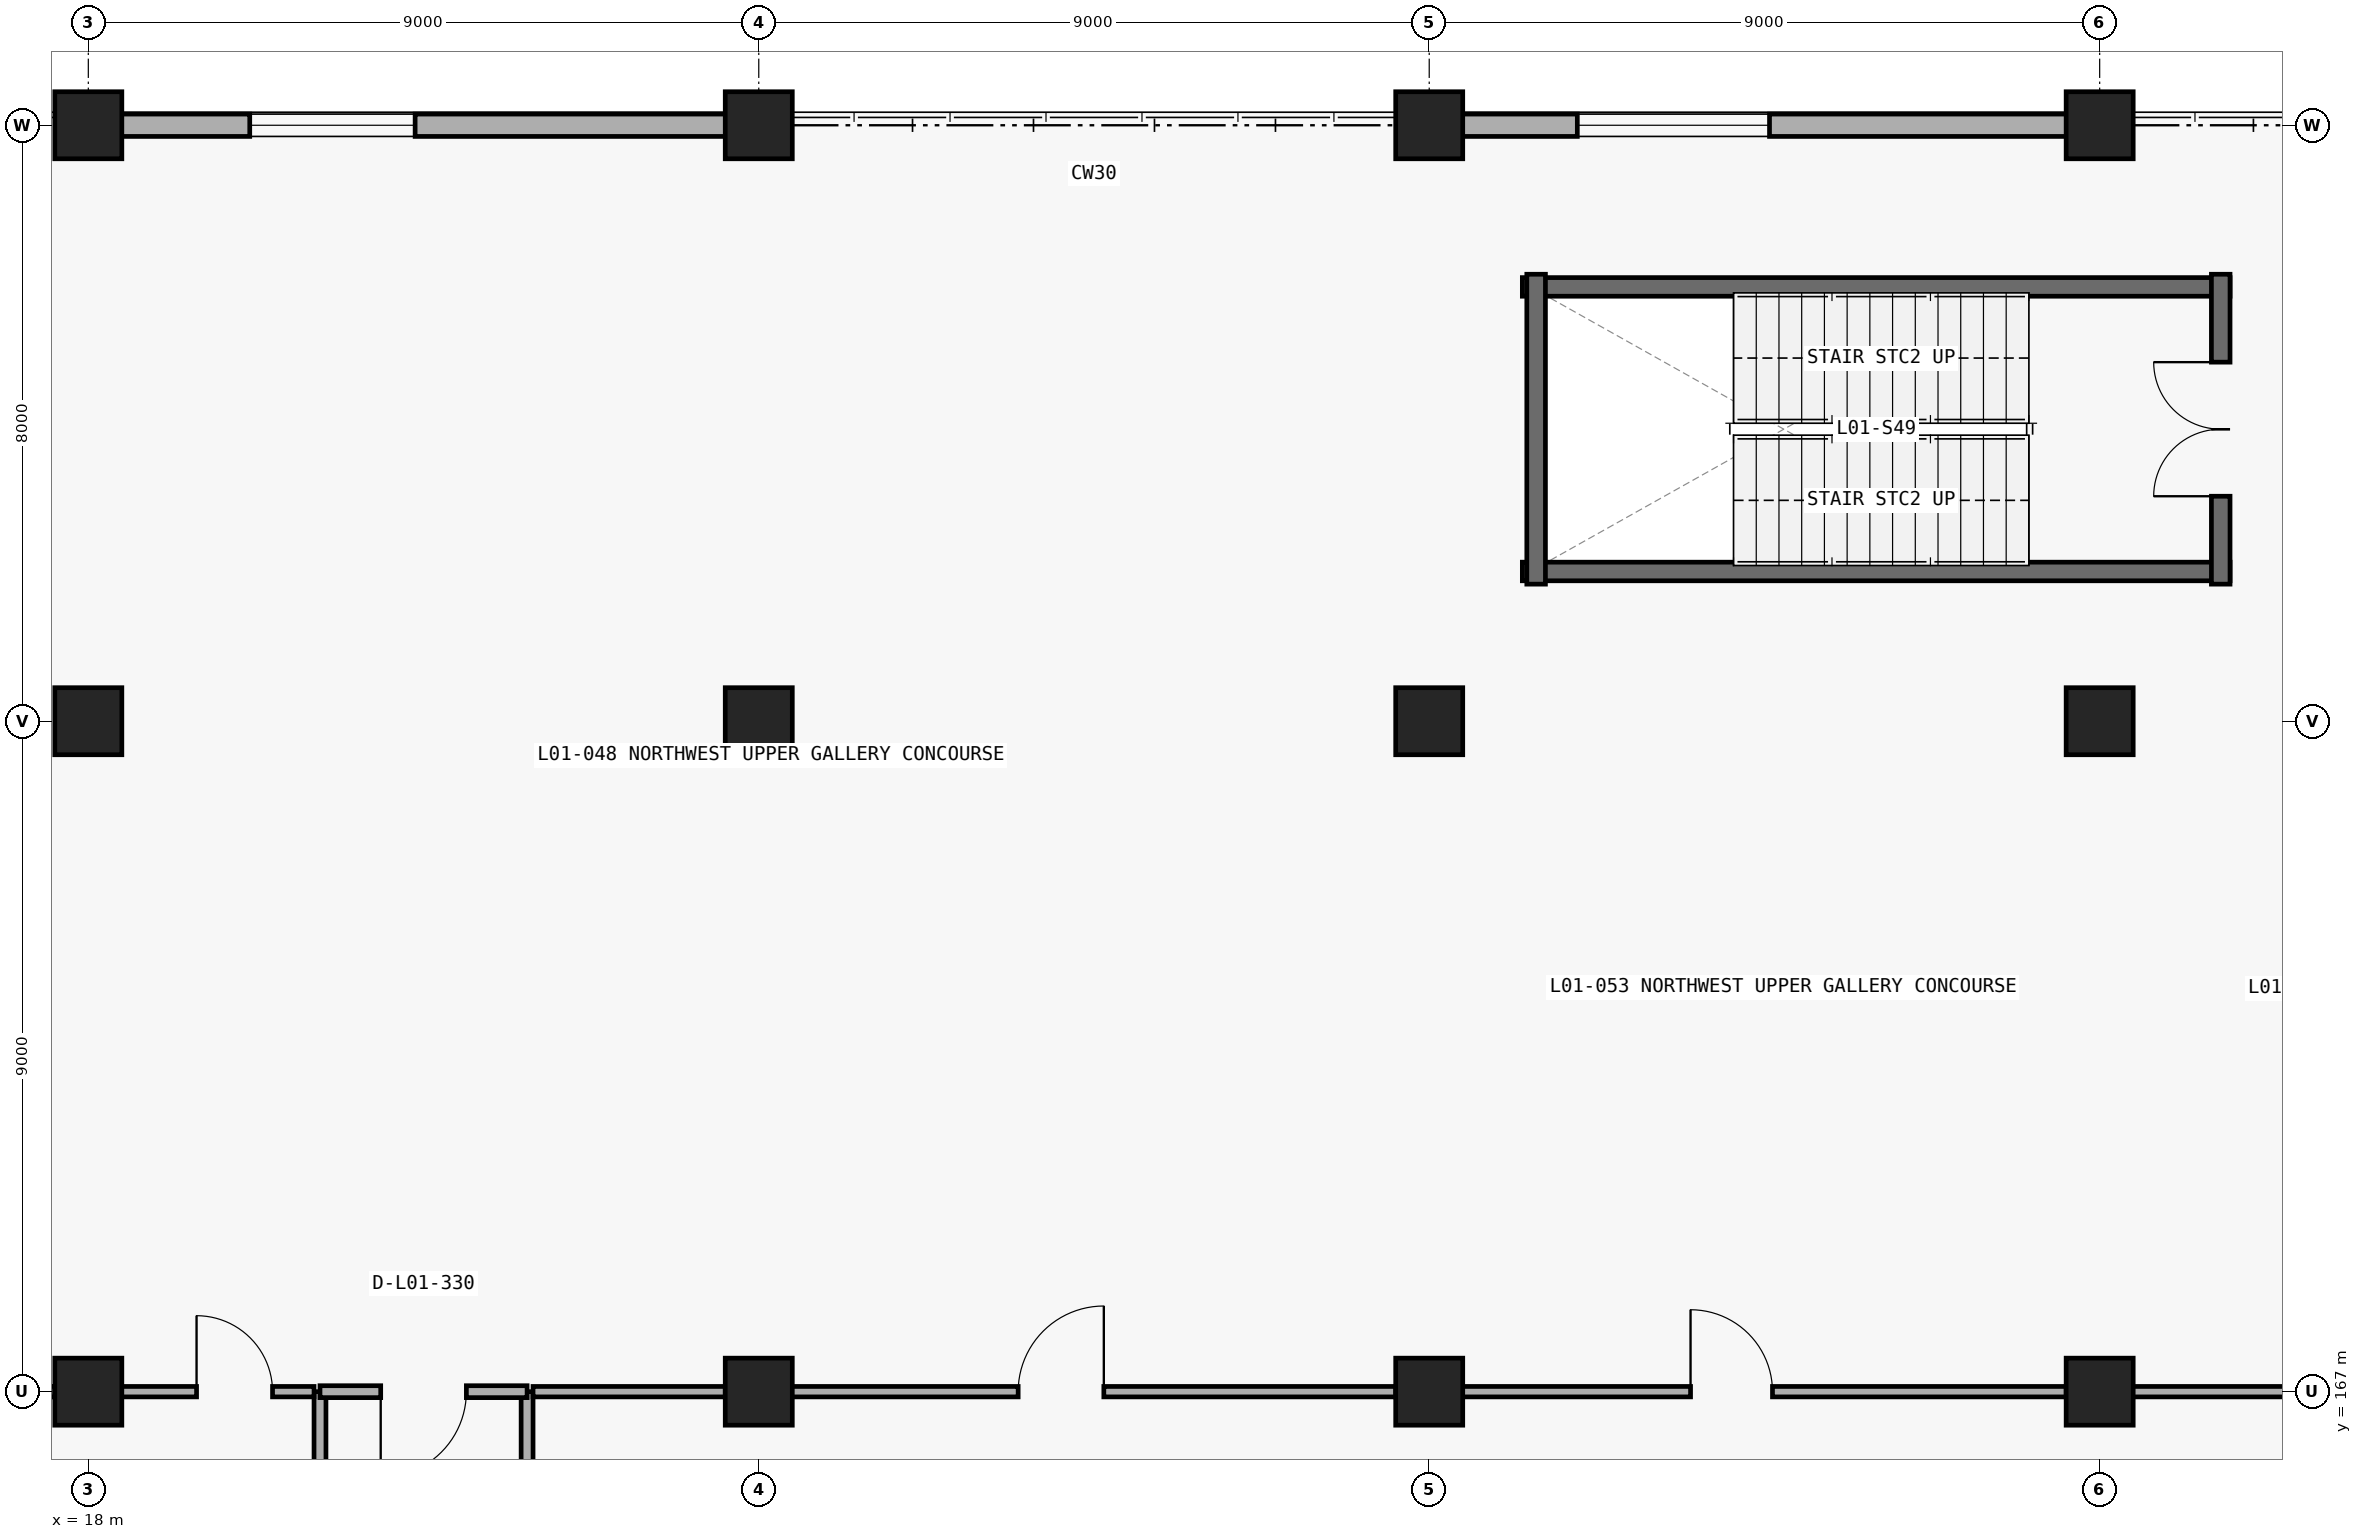
"""IFC4 building model, lengths in metres.
Left out: names, types, materials, properties, quantities, classifications, styles, units other than length and angle.
Written with IfcOpenShell. Run it as: python <this file> out.ifc"""

import sys

from ifc_helpers import new_model, si_unit, direction, frame, frame_2d, origin, origin_2d, place, context, subcontext, project, spatial, rectangle, extrude, element, fill, save


model = new_model("IFC4")
c1 = context("Model", 3, precision=1e-05, world=origin(), true_north=direction((0.0, 1.0)))
c2 = subcontext(c1, "Body", "Model", "MODEL_VIEW")
j1 = project(units=[si_unit("LENGTHUNIT", "METRE"), si_unit("PLANEANGLEUNIT", "RADIAN")], contexts=[c1])
p1 = place(None, origin())
s1 = spatial("IfcSite", under=j1, at=p1, CompositionType="ELEMENT")
p2 = place(p1, origin())
s2 = spatial("IfcBuilding", under=s1, at=p2, CompositionType="ELEMENT")
p3 = place(p2, frame((0.0, 0.0, 5.4)))
s3 = spatial("IfcBuildingStorey", under=s2, at=p3, CompositionType="ELEMENT", Elevation=5.4)
for number, where, z_axis, x_axis in (
    (1, (18.0, 167.0, 0.0), (0.0, 0.0, 1.0), (1.0, 0.0, 0.0)),
    (2, (18.0, 176.0, 0.0), (0.0, 0.0, 1.0), (1.0, 0.0, 0.0)),
    (3, (18.0, 184.0, 0.0), (0.0, 0.0, 1.0), (1.0, 0.0, 0.0)),
    (4, (27.0, 167.0, 0.0), (0.0, 0.0, 1.0), (1.0, 0.0, 0.0)),
    (5, (27.0, 176.0, 0.0), (0.0, 0.0, 1.0), (1.0, 0.0, 0.0)),
    (6, (27.0, 184.0, 0.0), (0.0, 0.0, 1.0), (1.0, 0.0, 0.0)),
    (7, (36.0, 167.0, 0.0), (0.0, 0.0, 1.0), (1.0, 0.0, 0.0)),
    (8, (36.0, 176.0, 0.0), (0.0, 0.0, 1.0), (1.0, 0.0, 0.0)),
    (9, (36.0, 184.0, 0.0), (0.0, 0.0, 1.0), (1.0, 0.0, 0.0)),
    (10, (45.0, 167.0, 0.0), (0.0, 0.0, 1.0), (1.0, 0.0, 0.0)),
    (11, (45.0, 176.0, 0.0), (0.0, 0.0, 1.0), (1.0, 0.0, 0.0)),
    (12, (45.0, 184.0, 0.0), (0.0, 0.0, 1.0), (1.0, 0.0, 0.0)),
):
    element("IfcColumn", number, at=place(p3, frame(where, z_axis=z_axis, x_axis=x_axis)), inside=s3, PredefinedType="COLUMN", context=c2, shape_type="SweptSolid", body=[
        extrude(rectangle(XDim=0.9, YDim=0.9, at=origin_2d()), origin(), (0.0, 0.0, 1.0), 4.8),
    ])
p4 = place(p3, frame((18.425, 184.0, 0.0), z_axis=(0.0, 0.0, 1.0), x_axis=(1.0, 0.0, 0.0)))
e13 = element("IfcWall", 13, at=p4, inside=s3, PredefinedType="STANDARD", context=c2, shape_type="SweptSolid", body=[
    extrude(rectangle(XDim=8.15, YDim=0.3, at=frame_2d((4.075, 0.0))), origin(), (0.0, 0.0, 1.0), 3.804),
])
p5 = place(p4, frame((1.742, 0.0, 0.95)))
e14 = element("IfcOpeningElement", 14, at=p5, cuts=e13, PredefinedType="OPENING", context=c2, shape_type="SweptSolid", body=[
    extrude(rectangle(XDim=2.22, YDim=2.24, at=frame_2d((1.11, 1.12))), frame((0.0, 0.16, 0.0), z_axis=(0.0, -1.0, 0.0), x_axis=(1.0, 0.0, 0.0)), (0.0, 0.0, 1.0), 0.32),
])
p6 = place(p3, frame((36.425, 184.0, 0.0), z_axis=(0.0, 0.0, 1.0), x_axis=(1.0, 0.0, 0.0)))
e15 = element("IfcWall", 15, at=p6, inside=s3, PredefinedType="STANDARD", context=c2, shape_type="SweptSolid", body=[
    extrude(rectangle(XDim=8.15, YDim=0.3, at=frame_2d((4.075, 0.0))), origin(), (0.0, 0.0, 1.0), 3.804),
])
p7 = place(p6, frame((1.563, 0.0, 0.95)))
e16 = element("IfcOpeningElement", 16, at=p7, cuts=e15, PredefinedType="OPENING", context=c2, shape_type="SweptSolid", body=[
    extrude(rectangle(XDim=2.58, YDim=2.28, at=frame_2d((1.29, 1.14))), frame((0.0, 0.16, 0.0), z_axis=(0.0, -1.0, 0.0), x_axis=(1.0, 0.0, 0.0)), (0.0, 0.0, 1.0), 0.32),
])
for number, where, z_axis, x_axis in (
    (17, (46.75, 181.83, 0.0), (0.0, 0.0, 1.0), (-1.0, 0.0, 0.0)),
    (18, (37.25, 178.01, 0.0), (0.0, 0.0, 1.0), (1.0, 0.0, 0.0)),
):
    element("IfcWall", number, at=place(p3, frame(where, z_axis=z_axis, x_axis=x_axis)), inside=s3, PredefinedType="SHEAR", context=c2, shape_type="SweptSolid", body=[
        extrude(rectangle(XDim=9.5, YDim=0.25, at=frame_2d((4.75, 0.0))), origin(), (0.0, 0.0, 1.0), 4.52),
    ])
p8 = place(p3, frame((46.625, 177.84, 0.0), z_axis=(0.0, 0.0, 1.0), x_axis=(0.0, 1.0, 0.0)))
e19 = element("IfcWall", 19, at=p8, inside=s3, PredefinedType="SHEAR", context=c2, shape_type="SweptSolid", body=[
    extrude(rectangle(XDim=4.16, YDim=0.25, at=frame_2d((2.08, 0.0))), origin(), (0.0, 0.0, 1.0), 4.52),
])
p9 = place(p8, frame((1.18, 0.0, 0.0)))
e20 = element("IfcOpeningElement", 20, at=p9, cuts=e19, PredefinedType="OPENING", context=c2, shape_type="SweptSolid", body=[
    extrude(rectangle(XDim=1.8, YDim=2.25, at=frame_2d((0.9, 1.125))), frame((0.0, 0.135, 0.0), z_axis=(0.0, -1.0, 0.0), x_axis=(1.0, 0.0, 0.0)), (0.0, 0.0, 1.0), 0.27),
])
p10 = place(p3, frame((37.435, 182.0, 0.0), z_axis=(0.0, 0.0, 1.0), x_axis=(0.0, -1.0, 0.0)))
e21 = element("IfcWall", 21, at=p10, inside=s3, PredefinedType="SHEAR", context=c2, shape_type="SweptSolid", body=[
    extrude(rectangle(XDim=4.16, YDim=0.25, at=frame_2d((2.08, 0.0))), origin(), (0.0, 0.0, 1.0), 4.52),
])
for number, where, z_axis, x_axis in (
    (22, (23.89, 164.25, 0.0), (0.0, 0.0, 1.0), (0.0, 1.0, 0.0)),
    (23, (21.11, 164.25, 0.0), (0.0, 0.0, 1.0), (0.0, 1.0, 0.0)),
):
    element("IfcWall", number, at=place(p3, frame(where, z_axis=z_axis, x_axis=x_axis)), inside=s3, PredefinedType="PARTITIONING", context=c2, shape_type="SweptSolid", body=[
        extrude(rectangle(XDim=2.75, YDim=0.16, at=frame_2d((1.375, 0.0))), origin(), (0.0, 0.0, 1.0), 3.804),
    ])
p11 = place(p3, frame((23.89, 167.0, 0.0), z_axis=(0.0, 0.0, 1.0), x_axis=(-1.0, 0.0, 0.0)))
e24 = element("IfcWall", 24, at=p11, inside=s3, PredefinedType="PARTITIONING", context=c2, shape_type="SweptSolid", body=[
    extrude(rectangle(XDim=2.78, YDim=0.16, at=frame_2d((1.39, 0.0))), origin(), (0.0, 0.0, 1.0), 3.804),
])
p12 = place(p11, frame((0.815, 0.0, 0.0)))
e25 = element("IfcOpeningElement", 25, at=p12, cuts=e24, PredefinedType="OPENING", context=c2, shape_type="SweptSolid", body=[
    extrude(rectangle(XDim=1.15, YDim=2.2, at=frame_2d((0.575, 1.1))), frame((0.0, 0.09, 0.0), z_axis=(0.0, -1.0, 0.0), x_axis=(1.0, 0.0, 0.0)), (0.0, 0.0, 1.0), 0.18),
])
p13 = place(p3, frame((8.55, 167.0, 0.0), z_axis=(0.0, 0.0, 1.0), x_axis=(1.0, 0.0, 0.0)))
e26 = element("IfcWall", 26, at=p13, inside=s3, PredefinedType="PARTITIONING", context=c2, shape_type="SweptSolid", body=[
    extrude(rectangle(XDim=9.015, YDim=0.14, at=frame_2d((4.507, 0.0))), origin(), (0.0, 0.0, 1.0), 3.804),
])
p14 = place(p13, frame((3.633, 0.0, 0.0)))
e27 = element("IfcOpeningElement", 27, at=p14, cuts=e26, PredefinedType="OPENING", context=c2, shape_type="SweptSolid", body=[
    extrude(rectangle(XDim=1.75, YDim=2.3, at=frame_2d((0.875, 1.15))), frame((0.0, 0.08, 0.0), z_axis=(0.0, -1.0, 0.0), x_axis=(1.0, 0.0, 0.0)), (0.0, 0.0, 1.0), 0.16),
])
p15 = place(p3, frame((17.55, 167.0, 0.0), z_axis=(0.0, 0.0, 1.0), x_axis=(1.0, 0.0, 0.0)))
e28 = element("IfcWall", 28, at=p15, inside=s3, PredefinedType="PARTITIONING", context=c2, shape_type="SweptSolid", body=[
    extrude(rectangle(XDim=3.48, YDim=0.14, at=frame_2d((1.74, 0.0))), origin(), (0.0, 0.0, 1.0), 3.804),
])
p16 = place(p15, frame((1.903, 0.0, 0.0)))
e29 = element("IfcOpeningElement", 29, at=p16, cuts=e28, PredefinedType="OPENING", context=c2, shape_type="SweptSolid", body=[
    extrude(rectangle(XDim=1.02, YDim=2.2, at=frame_2d((0.51, 1.1))), frame((0.0, 0.08, 0.0), z_axis=(0.0, -1.0, 0.0), x_axis=(1.0, 0.0, 0.0)), (0.0, 0.0, 1.0), 0.16),
])
p17 = place(p3, frame((23.97, 167.0, 0.0), z_axis=(0.0, 0.0, 1.0), x_axis=(1.0, 0.0, 0.0)))
e30 = element("IfcWall", 30, at=p17, inside=s3, PredefinedType="PARTITIONING", context=c2, shape_type="SweptSolid", body=[
    extrude(rectangle(XDim=2.595, YDim=0.14, at=frame_2d((1.297, 0.0))), origin(), (0.0, 0.0, 1.0), 3.804),
])
p18 = place(p3, frame((26.55, 167.0, 0.0), z_axis=(0.0, 0.0, 1.0), x_axis=(1.0, 0.0, 0.0)))
e31 = element("IfcWall", 31, at=p18, inside=s3, PredefinedType="PARTITIONING", context=c2, shape_type="SweptSolid", body=[
    extrude(rectangle(XDim=9.015, YDim=0.14, at=frame_2d((4.507, 0.0))), origin(), (0.0, 0.0, 1.0), 3.804),
])
p19 = place(p18, frame((3.932, 0.0, 0.0)))
e32 = element("IfcOpeningElement", 32, at=p19, cuts=e31, PredefinedType="OPENING", context=c2, shape_type="SweptSolid", body=[
    extrude(rectangle(XDim=1.15, YDim=2.2, at=frame_2d((0.575, 1.1))), frame((0.0, 0.08, 0.0), z_axis=(0.0, -1.0, 0.0), x_axis=(1.0, 0.0, 0.0)), (0.0, 0.0, 1.0), 0.16),
])
p20 = place(p3, frame((35.55, 167.0, 0.0), z_axis=(0.0, 0.0, 1.0), x_axis=(1.0, 0.0, 0.0)))
e33 = element("IfcWall", 33, at=p20, inside=s3, PredefinedType="PARTITIONING", context=c2, shape_type="SweptSolid", body=[
    extrude(rectangle(XDim=9.015, YDim=0.14, at=frame_2d((4.507, 0.0))), origin(), (0.0, 0.0, 1.0), 3.804),
])
p21 = place(p20, frame((3.958, 0.0, 0.0)))
e34 = element("IfcOpeningElement", 34, at=p21, cuts=e33, PredefinedType="OPENING", context=c2, shape_type="SweptSolid", body=[
    extrude(rectangle(XDim=1.1, YDim=2.15, at=frame_2d((0.55, 1.075))), frame((0.0, 0.08, 0.0), z_axis=(0.0, -1.0, 0.0), x_axis=(1.0, 0.0, 0.0)), (0.0, 0.0, 1.0), 0.16),
])
p22 = place(p3, frame((44.55, 167.0, 0.0), z_axis=(0.0, 0.0, 1.0), x_axis=(1.0, 0.0, 0.0)))
e35 = element("IfcWall", 35, at=p22, inside=s3, PredefinedType="PARTITIONING", context=c2, shape_type="SweptSolid", body=[
    extrude(rectangle(XDim=9.015, YDim=0.14, at=frame_2d((4.507, 0.0))), origin(), (0.0, 0.0, 1.0), 3.804),
])
p23 = place(p22, frame((3.908, 0.0, 0.0)))
e36 = element("IfcOpeningElement", 36, at=p23, cuts=e35, PredefinedType="OPENING", context=c2, shape_type="SweptSolid", body=[
    extrude(rectangle(XDim=1.2, YDim=2.25, at=frame_2d((0.6, 1.125))), frame((0.0, 0.08, 0.0), z_axis=(0.0, -1.0, 0.0), x_axis=(1.0, 0.0, 0.0)), (0.0, 0.0, 1.0), 0.16),
])
p24 = place(p5, origin())
e37 = element("IfcWindow", 37, at=p24, inside=s3, PartitioningType="SINGLE_PANEL", PredefinedType="WINDOW", context=c2, shape_type="SweptSolid", body=[
    extrude(rectangle(XDim=2.22, YDim=2.24, at=frame_2d((1.11, 1.12))), frame((0.0, 0.03, 0.0), z_axis=(0.0, -1.0, 0.0), x_axis=(1.0, 0.0, 0.0)), (0.0, 0.0, 1.0), 0.06),
])
fill(e14, e37)
p25 = place(p7, origin())
e38 = element("IfcWindow", 38, at=p25, inside=s3, PartitioningType="SINGLE_PANEL", PredefinedType="WINDOW", context=c2, shape_type="SweptSolid", body=[
    extrude(rectangle(XDim=2.58, YDim=2.28, at=frame_2d((1.29, 1.14))), frame((0.0, 0.03, 0.0), z_axis=(0.0, -1.0, 0.0), x_axis=(1.0, 0.0, 0.0)), (0.0, 0.0, 1.0), 0.06),
])
fill(e16, e38)
p26 = place(p9, origin())
e39 = element("IfcDoor", 39, at=p26, inside=s3, OperationType="DOUBLE_DOOR_SINGLE_SWING", PredefinedType="DOOR", context=c2, shape_type="SweptSolid", body=[
    extrude(rectangle(XDim=1.8, YDim=2.25, at=frame_2d((0.9, 1.125))), frame((0.0, 0.025, 0.0), z_axis=(0.0, -1.0, 0.0), x_axis=(1.0, 0.0, 0.0)), (0.0, 0.0, 1.0), 0.05),
])
fill(e20, e39)
p27 = place(p12, origin())
e40 = element("IfcDoor", 40, at=p27, inside=s3, OperationType="SINGLE_SWING_RIGHT", PredefinedType="DOOR", context=c2, shape_type="SweptSolid", body=[
    extrude(rectangle(XDim=1.15, YDim=2.2, at=frame_2d((0.575, 1.1))), frame((0.0, 0.025, 0.0), z_axis=(0.0, -1.0, 0.0), x_axis=(1.0, 0.0, 0.0)), (0.0, 0.0, 1.0), 0.05),
])
fill(e25, e40)
p28 = place(p16, origin())
e41 = element("IfcDoor", 41, at=p28, inside=s3, OperationType="SINGLE_SWING_LEFT", PredefinedType="DOOR", context=c2, shape_type="SweptSolid", body=[
    extrude(rectangle(XDim=1.02, YDim=2.2, at=frame_2d((0.51, 1.1))), frame((0.0, 0.025, 0.0), z_axis=(0.0, -1.0, 0.0), x_axis=(1.0, 0.0, 0.0)), (0.0, 0.0, 1.0), 0.05),
])
fill(e29, e41)
p29 = place(p19, origin())
e42 = element("IfcDoor", 42, at=p29, inside=s3, OperationType="SINGLE_SWING_RIGHT", PredefinedType="DOOR", context=c2, shape_type="SweptSolid", body=[
    extrude(rectangle(XDim=1.15, YDim=2.2, at=frame_2d((0.575, 1.1))), frame((0.0, 0.025, 0.0), z_axis=(0.0, -1.0, 0.0), x_axis=(1.0, 0.0, 0.0)), (0.0, 0.0, 1.0), 0.05),
])
fill(e32, e42)
p30 = place(p21, origin())
e43 = element("IfcDoor", 43, at=p30, inside=s3, OperationType="SINGLE_SWING_LEFT", PredefinedType="DOOR", context=c2, shape_type="SweptSolid", body=[
    extrude(rectangle(XDim=1.1, YDim=2.15, at=frame_2d((0.55, 1.075))), frame((0.0, 0.025, 0.0), z_axis=(0.0, -1.0, 0.0), x_axis=(1.0, 0.0, 0.0)), (0.0, 0.0, 1.0), 0.05),
])
fill(e34, e43)
save(model, sys.argv[1])
